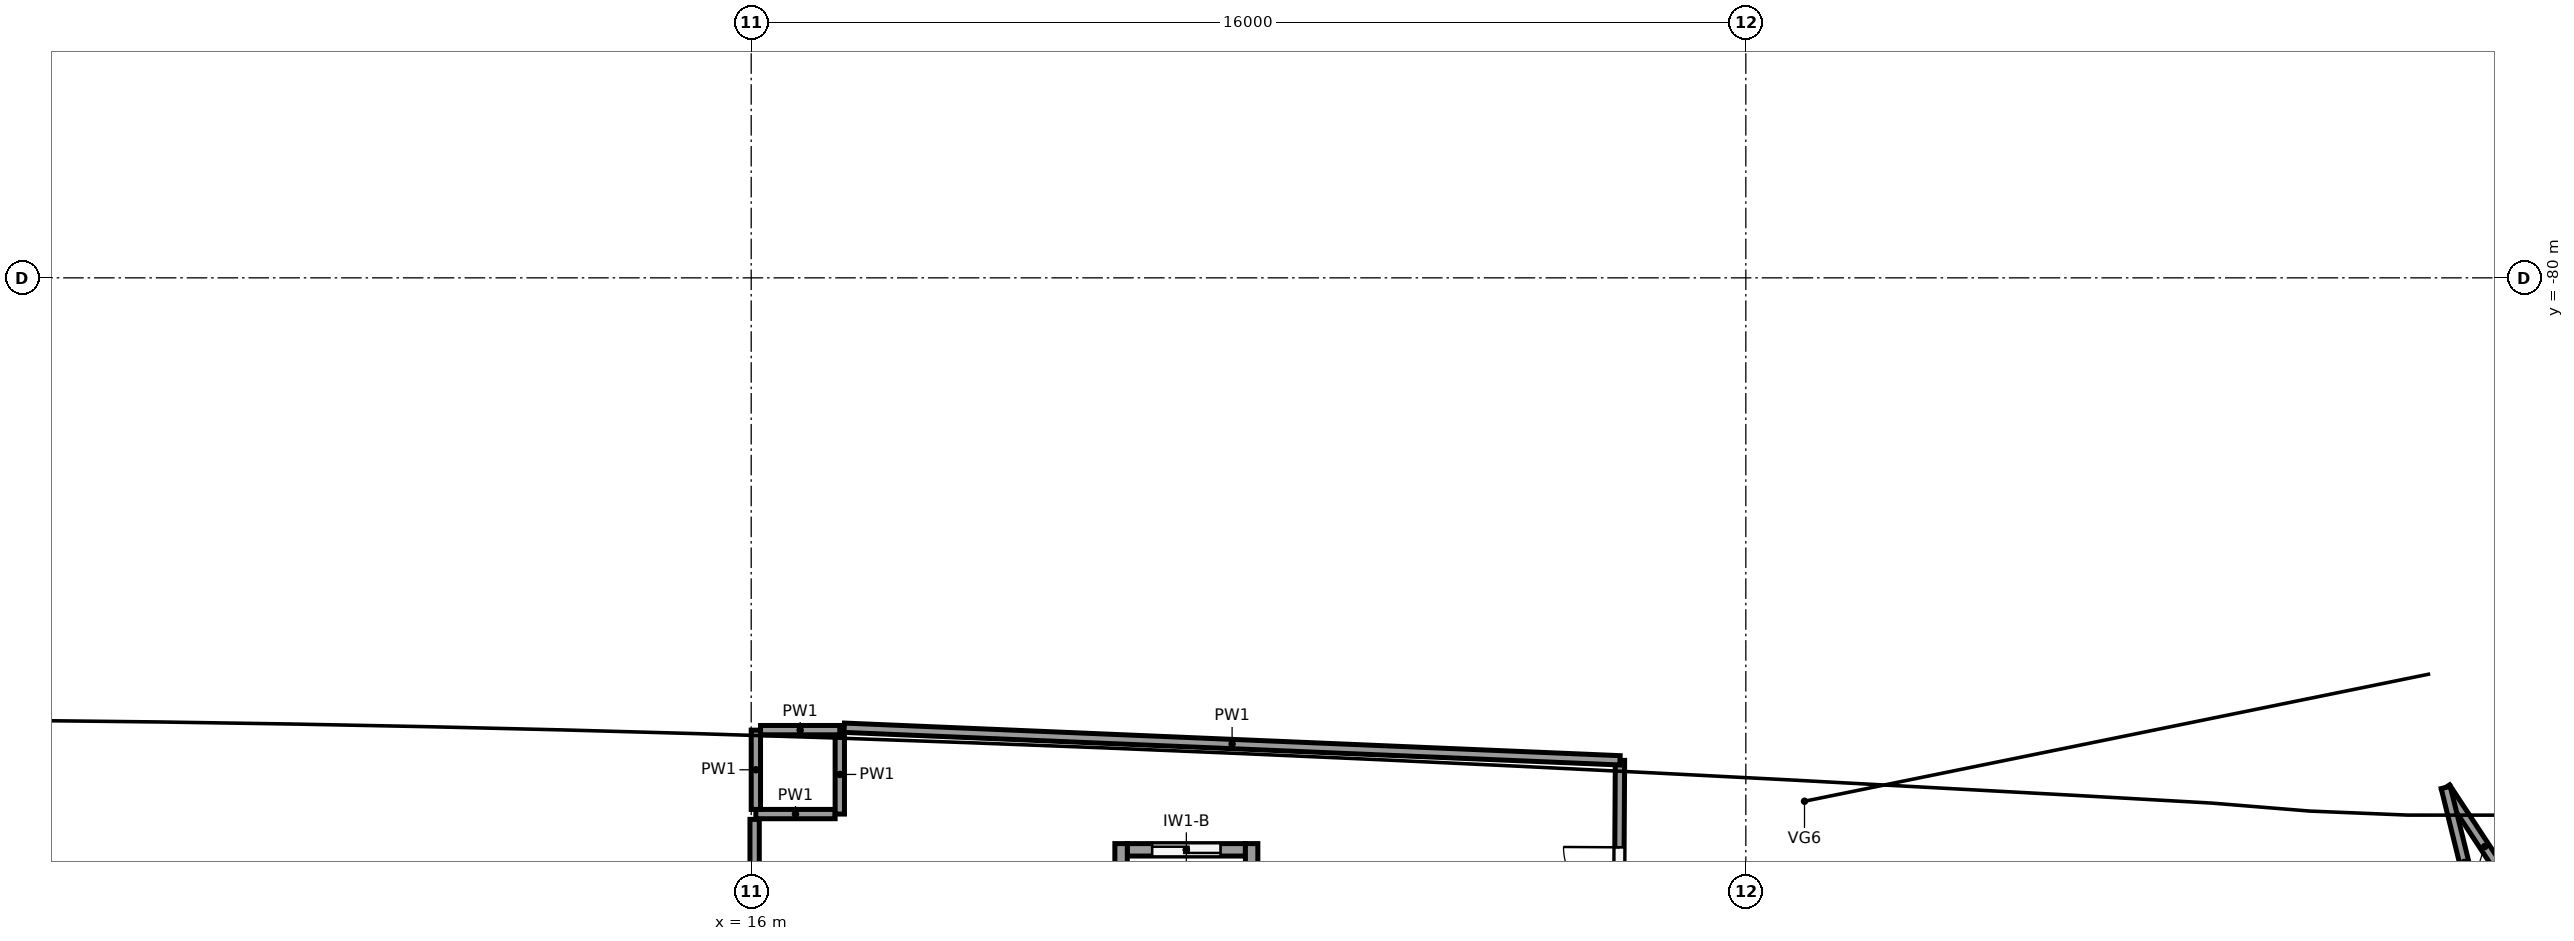
"""IFC4 building model, lengths in metres.
Left out: names, types, materials, properties, quantities, classifications, styles, units other than length and angle.
Written with IfcOpenShell. Run it as: python <this file> out.ifc"""

import sys

from ifc_helpers import new_model, si_unit, direction, frame, frame_2d, origin, origin_2d, place, context, subcontext, project, spatial, rectangle, circle, extrude, element, fill, save


model = new_model("IFC4")
c1 = context("Model", 3, precision=1e-05, world=origin(), true_north=direction((0.0, 1.0)))
c2 = subcontext(c1, "Body", "Model", "MODEL_VIEW")
j1 = project(units=[si_unit("LENGTHUNIT", "METRE"), si_unit("PLANEANGLEUNIT", "RADIAN")], contexts=[c1])
p1 = place(None, origin())
s1 = spatial("IfcSite", under=j1, at=p1, CompositionType="ELEMENT")
p2 = place(p1, origin())
s2 = spatial("IfcBuilding", under=s1, at=p2, CompositionType="ELEMENT")
p3 = place(p2, frame((0.0, 0.0, 24.0)))
s3 = spatial("IfcBuildingStorey", under=s2, at=p3, CompositionType="ELEMENT", Elevation=24.0)
p4 = place(p3, frame((6.871, -89.518, 0.0), z_axis=(0.0, 0.0, 1.0), x_axis=(1.0, 0.0, 0.0)))
e1 = element("IfcColumn", 1, at=p4, inside=s3, PredefinedType="COLUMN", context=c2, shape_type="SweptSolid", body=[
    extrude(circle(Radius=0.45, at=origin_2d()), origin(), (0.0, 0.0, 1.0), 4.8),
])
p5 = place(p3, frame((19.627, -89.904, 0.0), z_axis=(0.0, 0.0, 1.0), x_axis=(1.0, 0.0, 0.0)))
e2 = element("IfcColumn", 2, at=p5, inside=s3, PredefinedType="COLUMN", context=c2, shape_type="SweptSolid", body=[
    extrude(circle(Radius=0.55, at=origin_2d()), origin(), (0.0, 0.0, 1.0), 6.0),
])
for number, where, z_axis, x_axis in (
    (3, (21.95, -92.1, 0.0), (0.0, 0.0, 1.0), (0.0, 1.0, 0.0)),
    (4, (24.05, -92.1, 0.0), (0.0, 0.0, 1.0), (0.0, 1.0, 0.0)),
):
    element("IfcWall", number, at=place(p3, frame(where, z_axis=z_axis, x_axis=x_axis)), inside=s3, PredefinedType="SHEAR", context=c2, shape_type="SweptSolid", body=[
        extrude(rectangle(XDim=3.0, YDim=0.2, at=frame_2d((1.5, 0.0))), origin(), (0.0, 0.0, 1.0), 4.6),
    ])
p6 = place(p3, frame((22.05, -89.2, 0.0), z_axis=(0.0, 0.0, 1.0), x_axis=(1.0, 0.0, 0.0)))
e5 = element("IfcWall", 5, at=p6, inside=s3, PredefinedType="SHEAR", context=c2, shape_type="SweptSolid", body=[
    extrude(rectangle(XDim=1.9, YDim=0.2, at=frame_2d((0.95, 0.0))), origin(), (0.0, 0.0, 1.0), 4.6),
])
p7 = place(p6, frame((0.4, 0.0, 0.0)))
e6 = element("IfcOpeningElement", 6, at=p7, cuts=e5, PredefinedType="OPENING", context=c2, shape_type="SweptSolid", body=[
    extrude(rectangle(XDim=1.1, YDim=2.1, at=frame_2d((0.55, 1.05))), frame((0.0, 0.11, 0.0), z_axis=(0.0, -1.0, 0.0), x_axis=(1.0, 0.0, 0.0)), (0.0, 0.0, 1.0), 0.22),
])
p8 = place(p3, frame((16.075, -88.625, 0.0), z_axis=(0.0, 0.0, 1.0), x_axis=(1.0, 0.0, 0.0)))
e7 = element("IfcWall", 7, at=p8, inside=s3, PredefinedType="PARTITIONING", context=c2, shape_type="SweptSolid", body=[
    extrude(rectangle(XDim=1.275, YDim=0.15, at=frame_2d((0.638, 0.0))), origin(), (0.0, 0.0, 1.0), 5.4),
])
p9 = place(p3, frame((17.425, -88.625, 0.0), z_axis=(0.0, 0.0, 1.0), x_axis=(0.0, 1.0, 0.0)))
e8 = element("IfcWall", 8, at=p9, inside=s3, PredefinedType="PARTITIONING", context=c2, shape_type="SweptSolid", body=[
    extrude(rectangle(XDim=1.275, YDim=0.15, at=frame_2d((0.637, 0.0))), origin(), (0.0, 0.0, 1.0), 5.4),
])
for number, where, z_axis, x_axis in (
    (9, (17.425, -87.275, 0.0), (0.0, 0.0, 1.0), (-1.0, 0.0, 0.0)),
    (10, (16.075, -87.275, 0.0), (0.0, 0.0, 1.0), (0.0, -1.0, 0.0)),
):
    element("IfcWall", number, at=place(p3, frame(where, z_axis=z_axis, x_axis=x_axis)), inside=s3, PredefinedType="PARTITIONING", context=c2, shape_type="SweptSolid", body=[
        extrude(rectangle(XDim=1.275, YDim=0.15, at=frame_2d((0.638, 0.0))), origin(), (0.0, 0.0, 1.0), 5.4),
    ])
p10 = place(p3, frame((29.945, -92.81, 0.0), z_axis=(0.0, 0.0, 1.0), x_axis=(0.005947382846, 0.999982314162, 0.0)))
e11 = element("IfcWall", 11, at=p10, inside=s3, PredefinedType="PARTITIONING", context=c2, shape_type="SweptSolid", body=[
    extrude(rectangle(XDim=5.049, YDim=0.15, at=frame_2d((2.524, 0.0))), origin(), (0.0, 0.0, 1.0), 5.4),
])
p11 = place(p10, frame((1.85, 0.0, 0.0)))
e12 = element("IfcOpeningElement", 12, at=p11, cuts=e11, PredefinedType="OPENING", context=c2, shape_type="SweptSolid", body=[
    extrude(rectangle(XDim=1.8, YDim=2.1, at=frame_2d((0.9, 1.05))), frame((0.0, 0.085, 0.0), z_axis=(0.0, -1.0, 0.0), x_axis=(1.0, 0.0, 0.0)), (0.0, 0.0, 1.0), 0.17),
])
p12 = place(p3, frame((29.975, -87.76, 0.0), z_axis=(0.0, 0.0, 1.0), x_axis=(-0.999118137172, 0.041987474002, 0.0)))
e13 = element("IfcWall", 13, at=p12, inside=s3, PredefinedType="PARTITIONING", context=c2, shape_type="SweptSolid", body=[
    extrude(rectangle(XDim=12.49, YDim=0.15, at=frame_2d((6.245, 0.0))), origin(), (0.0, 0.0, 1.0), 5.4),
])
p13 = place(p3, frame((16.055, -88.71, 0.0), z_axis=(0.0, 0.0, 1.0), x_axis=(0.0, -1.0, 0.0)))
e14 = element("IfcWall", 14, at=p13, inside=s3, PredefinedType="PARTITIONING", context=c2, shape_type="SweptSolid", body=[
    extrude(rectangle(XDim=4.178, YDim=0.15, at=frame_2d((2.089, 0.0))), origin(), (0.0, 0.0, 1.0), 5.4),
])
p14 = place(p3, frame((44.512, -90.099, 0.0), z_axis=(0.0, 0.0, 1.0), x_axis=(-0.549992392725, 0.835169664167, 0.0)))
e15 = element("IfcWall", 15, at=p14, inside=s3, PredefinedType="PARTITIONING", context=c2, shape_type="SweptSolid", body=[
    extrude(rectangle(XDim=2.278, YDim=0.15, at=frame_2d((1.139, 0.0))), origin(), (0.0, 0.0, 1.0), 5.4),
])
p15 = place(p3, frame((43.259, -88.197, 0.0), z_axis=(0.0, 0.0, 1.0), x_axis=(0.239250025928, -0.970957993475, 0.0)))
e16 = element("IfcWall", 16, at=p15, inside=s3, PredefinedType="PARTITIONING", context=c2, shape_type="SweptSolid", body=[
    extrude(rectangle(XDim=2.484, YDim=0.15, at=frame_2d((1.242, 0.0))), origin(), (0.0, 0.0, 1.0), 5.4),
])
p16 = place(p7, origin())
e17 = element("IfcDoor", 17, at=p16, inside=s3, OperationType="SLIDING_TO_RIGHT", PredefinedType="DOOR", context=c2, shape_type="SweptSolid", body=[
    extrude(rectangle(XDim=1.1, YDim=2.1, at=frame_2d((0.55, 1.05))), frame((0.0, 0.025, 0.0), z_axis=(0.0, -1.0, 0.0), x_axis=(1.0, 0.0, 0.0)), (0.0, 0.0, 1.0), 0.05),
])
fill(e6, e17)
p17 = place(p11, origin())
e18 = element("IfcDoor", 18, at=p17, inside=s3, OperationType="DOUBLE_DOOR_SINGLE_SWING", PredefinedType="DOOR", context=c2, shape_type="SweptSolid", body=[
    extrude(rectangle(XDim=1.8, YDim=2.1, at=frame_2d((0.9, 1.05))), frame((0.0, 0.025, 0.0), z_axis=(0.0, -1.0, 0.0), x_axis=(1.0, 0.0, 0.0)), (0.0, 0.0, 1.0), 0.05),
])
fill(e12, e18)
save(model, sys.argv[1])
